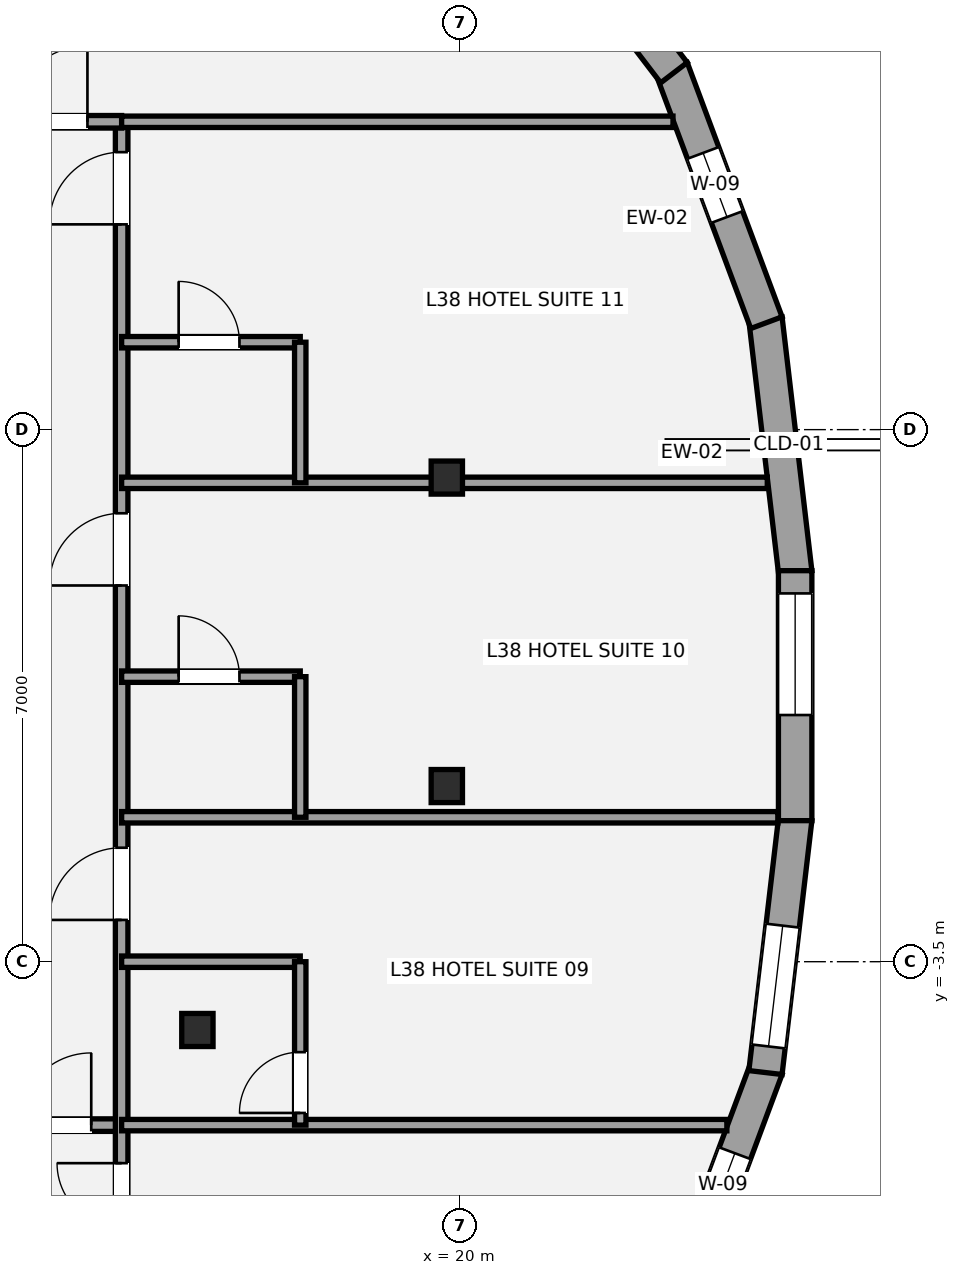
"""IFC4 building model, lengths in metres.
Left out: names, types, materials, properties, quantities, classifications, styles, units other than length and angle.
Written with IfcOpenShell. Run it as: python <this file> out.ifc"""

import sys

from ifc_helpers import new_model, si_unit, direction, frame, frame_2d, origin, origin_2d, place, context, subcontext, project, spatial, rectangle, i_section, extrude, element, fill, save


model = new_model("IFC4")
c1 = context("Model", 3, precision=1e-05, world=origin(), true_north=direction((0.0, 1.0)))
c2 = subcontext(c1, "Body", "Model", "MODEL_VIEW")
j1 = project(units=[si_unit("LENGTHUNIT", "METRE"), si_unit("PLANEANGLEUNIT", "RADIAN")], contexts=[c1])
p1 = place(None, origin())
s1 = spatial("IfcSite", under=j1, at=p1, CompositionType="ELEMENT")
p2 = place(p1, origin())
s2 = spatial("IfcBuilding", under=s1, at=p2, CompositionType="ELEMENT")
p3 = place(p2, frame((0.0, 0.0, 143.8)))
s3 = spatial("IfcBuildingStorey", under=s2, at=p3, CompositionType="ELEMENT", Elevation=143.8)
for number, where, z_axis, x_axis in (
    (1, (19.828, 2.869, 0.0), (0.0, 0.0, 1.0), (1.0, 0.0, 0.0)),
    (2, (16.547, -4.398, 0.0), (0.0, 0.0, 1.0), (1.0, 0.0, 0.0)),
    (3, (19.828, -1.189, 0.0), (0.0, 0.0, 1.0), (1.0, 0.0, 0.0)),
):
    element("IfcColumn", number, at=place(p3, frame(where, z_axis=z_axis, x_axis=x_axis)), inside=s3, PredefinedType="COLUMN", context=c2, shape_type="SweptSolid", body=[
        extrude(i_section(OverallWidth=0.412, OverallDepth=0.435, WebThickness=0.036, FlangeThickness=0.057, at=origin_2d()), origin(), (0.0, 0.0, 1.0), 3.2),
    ])
p4 = place(p3, frame((24.021, 4.958, 0.0), z_axis=(0.0, 0.0, 1.0), x_axis=(0.116605336518, -0.993178330158, 0.0)))
e4 = element("IfcWall", 4, at=p4, inside=s3, PredefinedType="STANDARD", context=c2, shape_type="SweptSolid", body=[
    extrude(rectangle(XDim=3.363, YDim=0.44, at=frame_2d((1.681, 0.0))), origin(), (0.0, 0.0, 1.0), 2.315),
])
p5 = place(p3, frame((22.785, 8.253, 0.0), z_axis=(0.0, 0.0, 1.0), x_axis=(0.349422124021, -0.936965409844, 0.0)))
e5 = element("IfcWall", 5, at=p5, inside=s3, PredefinedType="STANDARD", context=c2, shape_type="SweptSolid", body=[
    extrude(rectangle(XDim=3.571, YDim=0.44, at=frame_2d((1.786, 0.0))), origin(), (0.0, 0.0, 1.0), 2.315),
])
p6 = place(p5, frame((1.188, 0.0, 0.58)))
e6 = element("IfcOpeningElement", 6, at=p6, cuts=e5, PredefinedType="OPENING", context=c2, shape_type="SweptSolid", body=[
    extrude(rectangle(XDim=0.9, YDim=1.35, at=frame_2d((0.45, 0.675))), frame((0.0, 0.23, 0.0), z_axis=(0.0, -1.0, 0.0), x_axis=(1.0, 0.0, 0.0)), (0.0, 0.0, 1.0), 0.46),
])
p7 = place(p3, frame((20.425, 11.326, 0.0), z_axis=(0.0, 0.0, 1.0), x_axis=(0.607215400231, -0.794537260122, 0.0)))
e7 = element("IfcWall", 7, at=p7, inside=s3, PredefinedType="STANDARD", context=c2, shape_type="SweptSolid", body=[
    extrude(rectangle(XDim=3.939, YDim=0.44, at=frame_2d((1.969, 0.0))), origin(), (0.0, 0.0, 1.0), 2.315),
])
p8 = place(p7, frame((1.542, 0.0, 0.58)))
e8 = element("IfcOpeningElement", 8, at=p8, cuts=e7, PredefinedType="OPENING", context=c2, shape_type="SweptSolid", body=[
    extrude(rectangle(XDim=1.6, YDim=1.55, at=frame_2d((0.8, 0.775))), frame((0.0, 0.23, 0.0), z_axis=(0.0, -1.0, 0.0), x_axis=(1.0, 0.0, 0.0)), (0.0, 0.0, 1.0), 0.46),
])
p9 = place(p3, frame((24.033, -4.907, 0.0), z_axis=(0.0, 0.0, 1.0), x_axis=(-0.349422124021, -0.936965409844, 0.0)))
e9 = element("IfcWall", 9, at=p9, inside=s3, PredefinedType="STANDARD", context=c2, shape_type="SweptSolid", body=[
    extrude(rectangle(XDim=3.571, YDim=0.44, at=frame_2d((1.786, 0.0))), origin(), (0.0, 0.0, 1.0), 2.315),
])
p10 = place(p9, frame((1.188, 0.0, 0.58)))
e10 = element("IfcOpeningElement", 10, at=p10, cuts=e9, PredefinedType="OPENING", context=c2, shape_type="SweptSolid", body=[
    extrude(rectangle(XDim=0.9, YDim=1.35, at=frame_2d((0.45, 0.675))), frame((0.0, 0.23, 0.0), z_axis=(0.0, -1.0, 0.0), x_axis=(1.0, 0.0, 0.0)), (0.0, 0.0, 1.0), 0.46),
])
p11 = place(p3, frame((24.413, -1.619, 0.0), z_axis=(0.0, 0.0, 1.0), x_axis=(-0.116605336518, -0.993178330158, 0.0)))
e11 = element("IfcWall", 11, at=p11, inside=s3, PredefinedType="STANDARD", context=c2, shape_type="SweptSolid", body=[
    extrude(rectangle(XDim=3.363, YDim=0.44, at=frame_2d((1.681, 0.0))), origin(), (0.0, 0.0, 1.0), 2.315),
])
p12 = place(p11, frame((1.417, 0.0, 0.58)))
e12 = element("IfcOpeningElement", 12, at=p12, cuts=e11, PredefinedType="OPENING", context=c2, shape_type="SweptSolid", body=[
    extrude(rectangle(XDim=1.6, YDim=1.55, at=frame_2d((0.8, 0.775))), frame((0.0, 0.23, 0.0), z_axis=(0.0, -1.0, 0.0), x_axis=(1.0, 0.0, 0.0)), (0.0, 0.0, 1.0), 0.46),
])
p13 = place(p3, frame((24.412, 1.644, 0.0), z_axis=(0.0, 0.0, 1.0), x_axis=(0.0, -1.0, 0.0)))
e13 = element("IfcWall", 13, at=p13, inside=s3, PredefinedType="STANDARD", context=c2, shape_type="SweptSolid", body=[
    extrude(rectangle(XDim=3.289, YDim=0.44, at=frame_2d((1.644, 0.0))), origin(), (0.0, 0.0, 1.0), 2.315),
])
p14 = place(p13, frame((0.299, 0.0, 0.58)))
e14 = element("IfcOpeningElement", 14, at=p14, cuts=e13, PredefinedType="OPENING", context=c2, shape_type="SweptSolid", body=[
    extrude(rectangle(XDim=1.6, YDim=1.55, at=frame_2d((0.8, 0.775))), frame((0.0, 0.23, 0.0), z_axis=(0.0, -1.0, 0.0), x_axis=(1.0, 0.0, 0.0)), (0.0, 0.0, 1.0), 0.46),
])
p15 = place(p3, frame((-15.55, -5.65, 0.0), z_axis=(0.0, 0.0, 1.0), x_axis=(1.0, 0.0, 0.0)))
e15 = element("IfcWall", 15, at=p15, inside=s3, PredefinedType="PARTITIONING", context=c2, shape_type="SweptSolid", body=[
    extrude(rectangle(XDim=31.1, YDim=0.165, at=frame_2d((15.55, 0.0))), origin(), (0.0, 0.0, 1.0), 2.398),
])
p16 = place(p15, frame((4.6, 0.0, 0.0)))
e16 = element("IfcOpeningElement", 16, at=p16, cuts=e15, PredefinedType="OPENING", context=c2, shape_type="SweptSolid", body=[
    extrude(rectangle(XDim=0.95, YDim=2.15, at=frame_2d((0.475, 1.075))), frame((0.0, 0.093, 0.0), z_axis=(0.0, -1.0, 0.0), x_axis=(1.0, 0.0, 0.0)), (0.0, 0.0, 1.0), 0.185),
])
p17 = place(p15, frame((11.0, 0.0, 0.0)))
e17 = element("IfcOpeningElement", 17, at=p17, cuts=e15, PredefinedType="OPENING", context=c2, shape_type="SweptSolid", body=[
    extrude(rectangle(XDim=0.95, YDim=2.15, at=frame_2d((0.475, 1.075))), frame((0.0, 0.093, 0.0), z_axis=(0.0, -1.0, 0.0), x_axis=(1.0, 0.0, 0.0)), (0.0, 0.0, 1.0), 0.185),
])
p18 = place(p15, frame((17.4, 0.0, 0.0)))
e18 = element("IfcOpeningElement", 18, at=p18, cuts=e15, PredefinedType="OPENING", context=c2, shape_type="SweptSolid", body=[
    extrude(rectangle(XDim=0.95, YDim=2.15, at=frame_2d((0.475, 1.075))), frame((0.0, 0.093, 0.0), z_axis=(0.0, -1.0, 0.0), x_axis=(1.0, 0.0, 0.0)), (0.0, 0.0, 1.0), 0.185),
])
p19 = place(p15, frame((23.8, 0.0, 0.0)))
e19 = element("IfcOpeningElement", 19, at=p19, cuts=e15, PredefinedType="OPENING", context=c2, shape_type="SweptSolid", body=[
    extrude(rectangle(XDim=0.95, YDim=2.15, at=frame_2d((0.475, 1.075))), frame((0.0, 0.093, 0.0), z_axis=(0.0, -1.0, 0.0), x_axis=(1.0, 0.0, 0.0)), (0.0, 0.0, 1.0), 0.185),
])
p20 = place(p15, frame((29.75, 0.0, 0.0)))
e20 = element("IfcOpeningElement", 20, at=p20, cuts=e15, PredefinedType="OPENING", context=c2, shape_type="SweptSolid", body=[
    extrude(rectangle(XDim=0.95, YDim=2.15, at=frame_2d((0.475, 1.075))), frame((0.0, 0.093, 0.0), z_axis=(0.0, -1.0, 0.0), x_axis=(1.0, 0.0, 0.0)), (0.0, 0.0, 1.0), 0.185),
])
p21 = place(p3, frame((15.55, -13.965, 0.0), z_axis=(0.0, 0.0, 1.0), x_axis=(0.0, 1.0, 0.0)))
e21 = element("IfcWall", 21, at=p21, inside=s3, PredefinedType="PARTITIONING", context=c2, shape_type="SweptSolid", body=[
    extrude(rectangle(XDim=21.515, YDim=0.165, at=frame_2d((10.757, 0.0))), origin(), (0.0, 0.0, 1.0), 2.473),
])
p22 = place(p21, frame((6.964, 0.0, 0.0)))
e22 = element("IfcOpeningElement", 22, at=p22, cuts=e21, PredefinedType="OPENING", context=c2, shape_type="SweptSolid", body=[
    extrude(rectangle(XDim=0.85, YDim=2.1, at=frame_2d((0.425, 1.05))), frame((0.0, 0.093, 0.0), z_axis=(0.0, -1.0, 0.0), x_axis=(1.0, 0.0, 0.0)), (0.0, 0.0, 1.0), 0.185),
])
p23 = place(p21, frame((11.014, 0.0, 0.0)))
e23 = element("IfcOpeningElement", 23, at=p23, cuts=e21, PredefinedType="OPENING", context=c2, shape_type="SweptSolid", body=[
    extrude(rectangle(XDim=0.95, YDim=2.15, at=frame_2d((0.475, 1.075))), frame((0.0, 0.093, 0.0), z_axis=(0.0, -1.0, 0.0), x_axis=(1.0, 0.0, 0.0)), (0.0, 0.0, 1.0), 0.185),
])
p24 = place(p21, frame((15.414, 0.0, 0.0)))
e24 = element("IfcOpeningElement", 24, at=p24, cuts=e21, PredefinedType="OPENING", context=c2, shape_type="SweptSolid", body=[
    extrude(rectangle(XDim=0.95, YDim=2.15, at=frame_2d((0.475, 1.075))), frame((0.0, 0.093, 0.0), z_axis=(0.0, -1.0, 0.0), x_axis=(1.0, 0.0, 0.0)), (0.0, 0.0, 1.0), 0.185),
])
p25 = place(p21, frame((20.165, 0.0, 0.0)))
e25 = element("IfcOpeningElement", 25, at=p25, cuts=e21, PredefinedType="OPENING", context=c2, shape_type="SweptSolid", body=[
    extrude(rectangle(XDim=0.95, YDim=2.15, at=frame_2d((0.475, 1.075))), frame((0.0, 0.093, 0.0), z_axis=(0.0, -1.0, 0.0), x_axis=(1.0, 0.0, 0.0)), (0.0, 0.0, 1.0), 0.185),
])
p26 = place(p3, frame((13.8, 7.55, 0.0), z_axis=(0.0, 0.0, 1.0), x_axis=(1.0, 0.0, 0.0)))
e26 = element("IfcWall", 26, at=p26, inside=s3, PredefinedType="PARTITIONING", context=c2, shape_type="SweptSolid", body=[
    extrude(rectangle(XDim=1.75, YDim=0.165, at=frame_2d((0.875, 0.0))), origin(), (0.0, 0.0, 1.0), 2.473),
])
p27 = place(p26, frame((0.3, 0.0, 0.0)))
e27 = element("IfcOpeningElement", 27, at=p27, cuts=e26, PredefinedType="OPENING", context=c2, shape_type="SweptSolid", body=[
    extrude(rectangle(XDim=1.0, YDim=2.15, at=frame_2d((0.5, 1.075))), frame((0.0, 0.093, 0.0), z_axis=(0.0, -1.0, 0.0), x_axis=(1.0, 0.0, 0.0)), (0.0, 0.0, 1.0), 0.185),
])
p28 = place(p3, frame((15.55, 7.55, 0.0), z_axis=(0.0, 0.0, 1.0), x_axis=(1.0, 0.0, 0.0)))
e28 = element("IfcWall", 28, at=p28, inside=s3, PredefinedType="PLUMBINGWALL", context=c2, shape_type="SweptSolid", body=[
    extrude(rectangle(XDim=7.254, YDim=0.15, at=frame_2d((3.627, 0.0))), origin(), (0.0, 0.0, 1.0), 2.473),
])
p29 = place(p3, frame((15.55, -5.65, 0.0), z_axis=(0.0, 0.0, 1.0), x_axis=(1.0, 0.0, 0.0)))
e29 = element("IfcWall", 29, at=p29, inside=s3, PredefinedType="PLUMBINGWALL", context=c2, shape_type="SweptSolid", body=[
    extrude(rectangle(XDim=7.963, YDim=0.15, at=frame_2d((3.981, 0.0))), origin(), (0.0, 0.0, 1.0), 2.473),
])
p30 = place(p3, frame((15.55, -1.6, 0.0), z_axis=(0.0, 0.0, 1.0), x_axis=(1.0, 0.0, 0.0)))
e30 = element("IfcWall", 30, at=p30, inside=s3, PredefinedType="PLUMBINGWALL", context=c2, shape_type="SweptSolid", body=[
    extrude(rectangle(XDim=8.634, YDim=0.15, at=frame_2d((4.317, 0.0))), origin(), (0.0, 0.0, 1.0), 2.398),
])
p31 = place(p3, frame((15.55, 2.8, 0.0), z_axis=(0.0, 0.0, 1.0), x_axis=(1.0, 0.0, 0.0)))
e31 = element("IfcWall", 31, at=p31, inside=s3, PredefinedType="PLUMBINGWALL", context=c2, shape_type="SweptSolid", body=[
    extrude(rectangle(XDim=8.495, YDim=0.15, at=frame_2d((4.247, 0.0))), origin(), (0.0, 0.0, 1.0), 2.473),
])
p32 = place(p3, frame((15.55, -3.5, 0.0), z_axis=(0.0, 0.0, 1.0), x_axis=(1.0, 0.0, 0.0)))
e32 = element("IfcWall", 32, at=p32, inside=s3, PredefinedType="PLUMBINGWALL", context=c2, shape_type="SweptSolid", body=[
    extrude(rectangle(XDim=2.35, YDim=0.15, at=frame_2d((1.175, 0.0))), origin(), (0.0, 0.0, 1.0), 2.398),
])
p33 = place(p3, frame((17.9, -5.65, 0.0), z_axis=(0.0, 0.0, 1.0), x_axis=(0.0, 1.0, 0.0)))
e33 = element("IfcWall", 33, at=p33, inside=s3, PredefinedType="PLUMBINGWALL", context=c2, shape_type="SweptSolid", body=[
    extrude(rectangle(XDim=2.15, YDim=0.15, at=frame_2d((1.075, 0.0))), origin(), (0.0, 0.0, 1.0), 2.473),
])
p34 = place(p33, frame((0.16, 0.0, 0.0)))
e34 = element("IfcOpeningElement", 34, at=p34, cuts=e33, PredefinedType="OPENING", context=c2, shape_type="SweptSolid", body=[
    extrude(rectangle(XDim=0.8, YDim=2.1, at=frame_2d((0.4, 1.05))), frame((0.0, 0.085, 0.0), z_axis=(0.0, -1.0, 0.0), x_axis=(1.0, 0.0, 0.0)), (0.0, 0.0, 1.0), 0.17),
])
p35 = place(p3, frame((15.55, 0.25, 0.0), z_axis=(0.0, 0.0, 1.0), x_axis=(1.0, 0.0, 0.0)))
e35 = element("IfcWall", 35, at=p35, inside=s3, PredefinedType="PLUMBINGWALL", context=c2, shape_type="SweptSolid", body=[
    extrude(rectangle(XDim=2.35, YDim=0.15, at=frame_2d((1.175, 0.0))), origin(), (0.0, 0.0, 1.0), 2.473),
])
p36 = place(p35, frame((0.75, 0.0, 0.0)))
e36 = element("IfcOpeningElement", 36, at=p36, cuts=e35, PredefinedType="OPENING", context=c2, shape_type="SweptSolid", body=[
    extrude(rectangle(XDim=0.8, YDim=2.1, at=frame_2d((0.4, 1.05))), frame((0.0, 0.085, 0.0), z_axis=(0.0, -1.0, 0.0), x_axis=(1.0, 0.0, 0.0)), (0.0, 0.0, 1.0), 0.17),
])
p37 = place(p3, frame((17.9, -1.6, 0.0), z_axis=(0.0, 0.0, 1.0), x_axis=(0.0, 1.0, 0.0)))
e37 = element("IfcWall", 37, at=p37, inside=s3, PredefinedType="PLUMBINGWALL", context=c2, shape_type="SweptSolid", body=[
    extrude(rectangle(XDim=1.85, YDim=0.15, at=frame_2d((0.925, 0.0))), origin(), (0.0, 0.0, 1.0), 3.02),
])
p38 = place(p3, frame((15.55, 4.65, 0.0), z_axis=(0.0, 0.0, 1.0), x_axis=(1.0, 0.0, 0.0)))
e38 = element("IfcWall", 38, at=p38, inside=s3, PredefinedType="PLUMBINGWALL", context=c2, shape_type="SweptSolid", body=[
    extrude(rectangle(XDim=2.35, YDim=0.15, at=frame_2d((1.175, 0.0))), origin(), (0.0, 0.0, 1.0), 2.473),
])
p39 = place(p38, frame((0.75, 0.0, 0.0)))
e39 = element("IfcOpeningElement", 39, at=p39, cuts=e38, PredefinedType="OPENING", context=c2, shape_type="SweptSolid", body=[
    extrude(rectangle(XDim=0.8, YDim=2.1, at=frame_2d((0.4, 1.05))), frame((0.0, 0.085, 0.0), z_axis=(0.0, -1.0, 0.0), x_axis=(1.0, 0.0, 0.0)), (0.0, 0.0, 1.0), 0.17),
])
p40 = place(p3, frame((17.9, 2.8, 0.0), z_axis=(0.0, 0.0, 1.0), x_axis=(0.0, 1.0, 0.0)))
e40 = element("IfcWall", 40, at=p40, inside=s3, PredefinedType="PLUMBINGWALL", context=c2, shape_type="SweptSolid", body=[
    extrude(rectangle(XDim=1.85, YDim=0.15, at=frame_2d((0.925, 0.0))), origin(), (0.0, 0.0, 1.0), 3.02),
])
p41 = place(p6, origin())
e41 = element("IfcWindow", 41, at=p41, inside=s3, PartitioningType="SINGLE_PANEL", PredefinedType="WINDOW", context=c2, shape_type="SweptSolid", body=[
    extrude(rectangle(XDim=0.9, YDim=1.35, at=frame_2d((0.45, 0.675))), frame((0.0, -0.01, 0.0), z_axis=(0.0, -1.0, 0.0), x_axis=(1.0, 0.0, 0.0)), (0.0, 0.0, 1.0), 0.06),
])
fill(e6, e41)
p42 = place(p10, origin())
e42 = element("IfcWindow", 42, at=p42, inside=s3, PartitioningType="SINGLE_PANEL", PredefinedType="WINDOW", context=c2, shape_type="SweptSolid", body=[
    extrude(rectangle(XDim=0.9, YDim=1.35, at=frame_2d((0.45, 0.675))), frame((0.0, -0.01, 0.0), z_axis=(0.0, -1.0, 0.0), x_axis=(1.0, 0.0, 0.0)), (0.0, 0.0, 1.0), 0.06),
])
fill(e10, e42)
p43 = place(p12, origin())
e43 = element("IfcWindow", 43, at=p43, inside=s3, PartitioningType="SINGLE_PANEL", PredefinedType="WINDOW", context=c2, shape_type="SweptSolid", body=[
    extrude(rectangle(XDim=1.6, YDim=1.55, at=frame_2d((0.8, 0.775))), frame((0.0, -0.01, 0.0), z_axis=(0.0, -1.0, 0.0), x_axis=(1.0, 0.0, 0.0)), (0.0, 0.0, 1.0), 0.06),
])
fill(e12, e43)
p44 = place(p14, origin())
e44 = element("IfcWindow", 44, at=p44, inside=s3, PartitioningType="SINGLE_PANEL", PredefinedType="WINDOW", context=c2, shape_type="SweptSolid", body=[
    extrude(rectangle(XDim=1.6, YDim=1.55, at=frame_2d((0.8, 0.775))), frame((0.0, -0.01, 0.0), z_axis=(0.0, -1.0, 0.0), x_axis=(1.0, 0.0, 0.0)), (0.0, 0.0, 1.0), 0.06),
])
fill(e14, e44)
p45 = place(p27, origin())
e45 = element("IfcDoor", 45, at=p45, inside=s3, OperationType="SINGLE_SWING_RIGHT", PredefinedType="DOOR", context=c2, shape_type="SweptSolid", body=[
    extrude(rectangle(XDim=1.0, YDim=2.15, at=frame_2d((0.5, 1.075))), frame((0.0, 0.025, 0.0), z_axis=(0.0, -1.0, 0.0), x_axis=(1.0, 0.0, 0.0)), (0.0, 0.0, 1.0), 0.05),
])
fill(e27, e45)
p46 = place(p22, origin())
e46 = element("IfcDoor", 46, at=p46, inside=s3, OperationType="SINGLE_SWING_RIGHT", PredefinedType="DOOR", context=c2, shape_type="SweptSolid", body=[
    extrude(rectangle(XDim=0.85, YDim=2.1, at=frame_2d((0.425, 1.05))), frame((0.0, 0.025, 0.0), z_axis=(0.0, -1.0, 0.0), x_axis=(1.0, 0.0, 0.0)), (0.0, 0.0, 1.0), 0.05),
])
fill(e22, e46)
p47 = place(p20, origin())
e47 = element("IfcDoor", 47, at=p47, inside=s3, OperationType="SINGLE_SWING_RIGHT", PredefinedType="DOOR", context=c2, shape_type="SweptSolid", body=[
    extrude(rectangle(XDim=0.95, YDim=2.15, at=frame_2d((0.475, 1.075))), frame((0.0, 0.025, 0.0), z_axis=(0.0, -1.0, 0.0), x_axis=(1.0, 0.0, 0.0)), (0.0, 0.0, 1.0), 0.05),
])
fill(e20, e47)
p48 = place(p23, origin())
e48 = element("IfcDoor", 48, at=p48, inside=s3, OperationType="SINGLE_SWING_LEFT", PredefinedType="DOOR", context=c2, shape_type="SweptSolid", body=[
    extrude(rectangle(XDim=0.95, YDim=2.15, at=frame_2d((0.475, 1.075))), frame((0.0, 0.025, 0.0), z_axis=(0.0, -1.0, 0.0), x_axis=(1.0, 0.0, 0.0)), (0.0, 0.0, 1.0), 0.05),
])
fill(e23, e48)
p49 = place(p34, origin())
e49 = element("IfcDoor", 49, at=p49, inside=s3, OperationType="SINGLE_SWING_LEFT", PredefinedType="DOOR", context=c2, shape_type="SweptSolid", body=[
    extrude(rectangle(XDim=0.8, YDim=2.1, at=frame_2d((0.4, 1.05))), frame((0.0, 0.025, 0.0), z_axis=(0.0, -1.0, 0.0), x_axis=(1.0, 0.0, 0.0)), (0.0, 0.0, 1.0), 0.05),
])
fill(e34, e49)
p50 = place(p24, origin())
e50 = element("IfcDoor", 50, at=p50, inside=s3, OperationType="SINGLE_SWING_LEFT", PredefinedType="DOOR", context=c2, shape_type="SweptSolid", body=[
    extrude(rectangle(XDim=0.95, YDim=2.15, at=frame_2d((0.475, 1.075))), frame((0.0, 0.025, 0.0), z_axis=(0.0, -1.0, 0.0), x_axis=(1.0, 0.0, 0.0)), (0.0, 0.0, 1.0), 0.05),
])
fill(e24, e50)
p51 = place(p36, origin())
e51 = element("IfcDoor", 51, at=p51, inside=s3, OperationType="SINGLE_SWING_LEFT", PredefinedType="DOOR", context=c2, shape_type="SweptSolid", body=[
    extrude(rectangle(XDim=0.8, YDim=2.1, at=frame_2d((0.4, 1.05))), frame((0.0, 0.025, 0.0), z_axis=(0.0, -1.0, 0.0), x_axis=(1.0, 0.0, 0.0)), (0.0, 0.0, 1.0), 0.05),
])
fill(e36, e51)
p52 = place(p25, origin())
e52 = element("IfcDoor", 52, at=p52, inside=s3, OperationType="SINGLE_SWING_LEFT", PredefinedType="DOOR", context=c2, shape_type="SweptSolid", body=[
    extrude(rectangle(XDim=0.95, YDim=2.15, at=frame_2d((0.475, 1.075))), frame((0.0, 0.025, 0.0), z_axis=(0.0, -1.0, 0.0), x_axis=(1.0, 0.0, 0.0)), (0.0, 0.0, 1.0), 0.05),
])
fill(e25, e52)
p53 = place(p39, origin())
e53 = element("IfcDoor", 53, at=p53, inside=s3, OperationType="SINGLE_SWING_LEFT", PredefinedType="DOOR", context=c2, shape_type="SweptSolid", body=[
    extrude(rectangle(XDim=0.8, YDim=2.1, at=frame_2d((0.4, 1.05))), frame((0.0, 0.025, 0.0), z_axis=(0.0, -1.0, 0.0), x_axis=(1.0, 0.0, 0.0)), (0.0, 0.0, 1.0), 0.05),
])
fill(e39, e53)
save(model, sys.argv[1])
